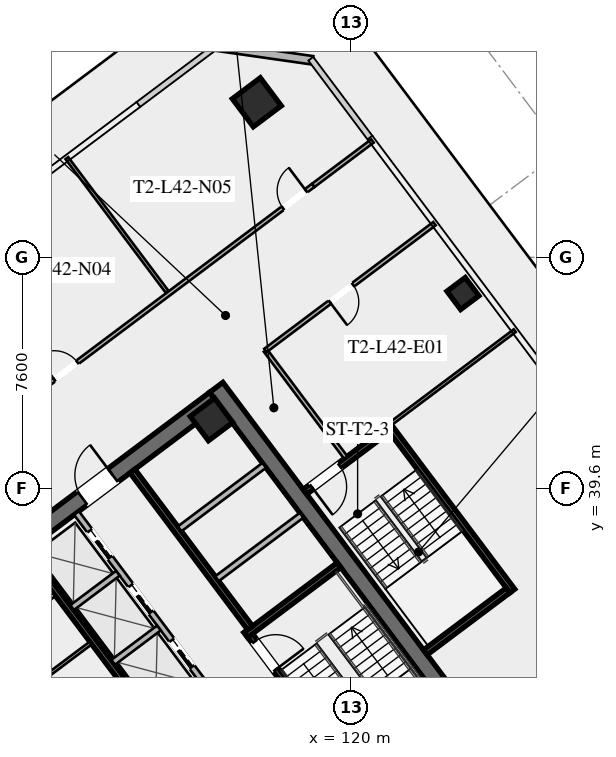
"""IFC4 building model, lengths in metres.
Left out: names, types, materials, properties, quantities, classifications, styles, units other than length and angle.
Written with IfcOpenShell. Run it as: python <this file> out.ifc"""

import sys

from ifc_helpers import new_model, si_unit, direction, frame, frame_2d, origin, origin_2d, place, context, subcontext, project, spatial, rectangle, hollow_rectangle, extrude, element, fill, save


model = new_model("IFC4")
c1 = context("Model", 3, precision=1e-05, world=origin(), true_north=direction((0.0, 1.0)))
c2 = subcontext(c1, "Body", "Model", "MODEL_VIEW")
j1 = project(units=[si_unit("LENGTHUNIT", "METRE"), si_unit("PLANEANGLEUNIT", "RADIAN")], contexts=[c1])
p1 = place(None, origin())
s1 = spatial("IfcSite", under=j1, at=p1, CompositionType="ELEMENT")
p2 = place(p1, origin())
s2 = spatial("IfcBuilding", under=s1, at=p2, CompositionType="ELEMENT")
p3 = place(p2, frame((0.0, 0.0, 157.0)))
s3 = spatial("IfcBuildingStorey", under=s2, at=p3, CompositionType="ELEMENT", Elevation=157.0)
for number, where, z_axis, x_axis in (
    (1, (112.436, 21.077, 0.0), (0.0, 0.0, 1.0), (-0.6, 0.8, 0.0)),
    (2, (115.564, 42.923, 0.0), (0.0, 0.0, 1.0), (0.6, -0.8, 0.0)),
):
    element("IfcWall", number, at=place(p3, frame(where, z_axis=z_axis, x_axis=x_axis)), inside=s3, PredefinedType="SHEAR", context=c2, shape_type="SweptSolid", body=[
        extrude(rectangle(XDim=15.6, YDim=0.55, at=frame_2d((7.8, 0.0))), origin(), (0.0, 0.0, 1.0), 3.55),
    ])
p4 = place(p3, frame((103.461, 33.502, 0.0), z_axis=(0.0, 0.0, 1.0), x_axis=(0.799998054672, 0.600002593761, 0.0)))
e3 = element("IfcWall", 3, at=p4, inside=s3, PredefinedType="SHEAR", context=c2, shape_type="SweptSolid", body=[
    extrude(rectangle(XDim=15.06, YDim=0.55, at=frame_2d((7.53, 0.0))), origin(), (0.0, 0.0, 1.0), 3.55),
])
p5 = place(p4, frame((4.58, 0.0, 0.0)))
e4 = element("IfcOpeningElement", 4, at=p5, cuts=e3, PredefinedType="OPENING", context=c2, shape_type="SweptSolid", body=[
    extrude(rectangle(XDim=1.25, YDim=2.25, at=frame_2d((0.625, 1.125))), frame((0.0, 0.285, 0.0), z_axis=(0.0, -1.0, 0.0), x_axis=(1.0, 0.0, 0.0)), (0.0, 0.0, 1.0), 0.57),
])
p6 = place(p4, frame((9.63, 0.0, 0.0)))
e5 = element("IfcOpeningElement", 5, at=p6, cuts=e3, PredefinedType="OPENING", context=c2, shape_type="SweptSolid", body=[
    extrude(rectangle(XDim=1.25, YDim=2.25, at=frame_2d((0.625, 1.125))), frame((0.0, 0.285, 0.0), z_axis=(0.0, -1.0, 0.0), x_axis=(1.0, 0.0, 0.0)), (0.0, 0.0, 1.0), 0.57),
])
p7 = place(p3, frame((115.41, 41.87, 0.0), z_axis=(0.0, 0.0, 1.0), x_axis=(0.799999996291, 0.600000004945, 0.0)))
e6 = element("IfcColumn", 6, at=p7, inside=s3, PredefinedType="COLUMN", context=c2, shape_type="SweptSolid", body=[
    extrude(hollow_rectangle(XDim=1.0, YDim=1.0, WallThickness=0.04, at=origin_2d()), origin(), (0.0, 0.0, 1.0), 3.37),
])
p8 = place(p3, frame((116.9, 52.3, -0.175), z_axis=(0.0, 0.0, 1.0), x_axis=(0.799999996291, 0.600000004945, 0.0)))
e7 = element("IfcColumn", 7, at=p8, inside=s3, PredefinedType="COLUMN", context=c2, shape_type="SweptSolid", body=[
    extrude(hollow_rectangle(XDim=1.15, YDim=1.15, WallThickness=0.045, at=origin_2d()), origin(), (0.0, 0.0, 1.0), 3.545),
])
p9 = place(p3, frame((123.68, 46.01, -0.175), z_axis=(0.0, 0.0, 1.0), x_axis=(0.799999996291, 0.600000004945, 0.0)))
e8 = element("IfcColumn", 8, at=p9, inside=s3, PredefinedType="COLUMN", context=c2, shape_type="SweptSolid", body=[
    extrude(hollow_rectangle(XDim=0.75, YDim=0.75, WallThickness=0.032, at=origin_2d()), origin(), (0.0, 0.0, 1.0), 3.545),
])
p10 = place(p3, frame((115.52, 54.14, 0.0), z_axis=(0.0, 0.0, 1.0), x_axis=(0.989950994782, -0.141410847992, 0.0)))
e9 = element("IfcWall", 9, at=p10, inside=s3, PredefinedType="SOLIDWALL", context=c2, shape_type="SweptSolid", body=[
    extrude(rectangle(XDim=3.253, YDim=0.28, at=frame_2d((1.626, 0.0))), origin(), (0.0, 0.0, 1.0), 3.37),
])
p11 = place(p3, frame((111.44, 29.08, 0.0), z_axis=(0.0, 0.0, 1.0), x_axis=(-0.59999029481, 0.8000072788, 0.0)))
e10 = element("IfcWall", 10, at=p11, inside=s3, PredefinedType="SHEAR", context=c2, shape_type="SweptSolid", body=[
    extrude(rectangle(XDim=8.05, YDim=0.2, at=frame_2d((4.025, 0.0))), origin(), (0.0, 0.0, 1.0), 3.37),
])
p12 = place(p11, frame((0.45, 0.0, 0.0)))
e11 = element("IfcOpeningElement", 11, at=p12, cuts=e10, PredefinedType="OPENING", context=c2, shape_type="SweptSolid", body=[
    extrude(rectangle(XDim=1.15, YDim=2.2, at=frame_2d((0.575, 1.1))), frame((0.0, 0.11, 0.0), z_axis=(0.0, -1.0, 0.0), x_axis=(1.0, 0.0, 0.0)), (0.0, 0.0, 1.0), 0.22),
])
p13 = place(p3, frame((116.56, 34.92, 0.0), z_axis=(0.0, 0.0, 1.0), x_axis=(0.59999029481, -0.8000072788, 0.0)))
e12 = element("IfcWall", 12, at=p13, inside=s3, PredefinedType="SHEAR", context=c2, shape_type="SweptSolid", body=[
    extrude(rectangle(XDim=8.05, YDim=0.2, at=frame_2d((4.025, 0.0))), origin(), (0.0, 0.0, 1.0), 3.37),
])
p14 = place(p13, frame((0.45, 0.0, 0.0)))
e13 = element("IfcOpeningElement", 13, at=p14, cuts=e12, PredefinedType="OPENING", context=c2, shape_type="SweptSolid", body=[
    extrude(rectangle(XDim=1.15, YDim=2.2, at=frame_2d((0.575, 1.1))), frame((0.0, 0.11, 0.0), z_axis=(0.0, -1.0, 0.0), x_axis=(1.0, 0.0, 0.0)), (0.0, 0.0, 1.0), 0.22),
])
p15 = place(p3, frame((116.54, 34.78, 0.0), z_axis=(0.0, 0.0, 1.0), x_axis=(0.800015298837, 0.599979601008, 0.0)))
e14 = element("IfcWall", 14, at=p15, inside=s3, PredefinedType="SHEAR", context=c2, shape_type="SweptSolid", body=[
    extrude(rectangle(XDim=3.83, YDim=0.2, at=frame_2d((1.915, 0.0))), origin(), (0.0, 0.0, 1.0), 3.37),
])
p16 = place(p3, frame((117.998, 25.936, 0.0), z_axis=(0.0, 0.0, 1.0), x_axis=(-0.600002693989, 0.799997979501, 0.0)))
e15 = element("IfcWall", 15, at=p16, inside=s3, PredefinedType="SHEAR", context=c2, shape_type="SweptSolid", body=[
    extrude(rectangle(XDim=14.5, YDim=0.2, at=frame_2d((7.25, 0.0))), origin(), (0.0, 0.0, 1.0), 3.37),
])
p17 = place(p3, frame((112.81, 40.17, 0.0), z_axis=(0.0, 0.0, 1.0), x_axis=(0.599993943644, -0.800004542231, 0.0)))
e16 = element("IfcWall", 16, at=p17, inside=s3, PredefinedType="SHEAR", context=c2, shape_type="SweptSolid", body=[
    extrude(rectangle(XDim=6.45, YDim=0.2, at=frame_2d((3.225, 0.0))), origin(), (0.0, 0.0, 1.0), 3.37),
])
for number, where, z_axis, x_axis in (
    (17, (115.59, 36.63, 0.0), (0.0, 0.0, 1.0), (0.8, 0.6, 0.0)),
    (18, (114.36, 38.27, 0.0), (0.0, 0.0, 1.0), (0.8, 0.6, 0.0)),
):
    element("IfcWall", number, at=place(p3, frame(where, z_axis=z_axis, x_axis=x_axis)), inside=s3, PredefinedType="SOLIDWALL", context=c2, shape_type="SweptSolid", body=[
        extrude(rectangle(XDim=3.48, YDim=0.2, at=frame_2d((1.74, 0.0))), origin(), (0.0, 0.0, 1.0), 3.37),
    ])
p18 = place(p3, frame((107.71, 34.22, 0.0), z_axis=(0.0, 0.0, 1.0), x_axis=(0.799981399002, 0.60002480053, 0.0)))
e19 = element("IfcWall", 19, at=p18, inside=s3, PredefinedType="PARTITIONING", context=c2, shape_type="SweptSolid", body=[
    extrude(rectangle(XDim=3.15, YDim=0.135, at=frame_2d((1.575, 0.0))), origin(), (0.0, 0.0, 1.0), 2.723),
])
p19 = place(p18, frame((1.05, 0.0, 0.0)))
e20 = element("IfcOpeningElement", 20, at=p19, cuts=e19, PredefinedType="OPENING", context=c2, shape_type="SweptSolid", body=[
    extrude(rectangle(XDim=1.05, YDim=2.2, at=frame_2d((0.525, 1.1))), frame((0.0, 0.077, 0.0), z_axis=(0.0, -1.0, 0.0), x_axis=(1.0, 0.0, 0.0)), (0.0, 0.0, 1.0), 0.155),
])
p20 = place(p3, frame((108.91, 32.62, 0.0), z_axis=(0.0, 0.0, 1.0), x_axis=(0.800018601094, 0.59997519774, 0.0)))
e21 = element("IfcWall", 21, at=p20, inside=s3, PredefinedType="PARTITIONING", context=c2, shape_type="SweptSolid", body=[
    extrude(rectangle(XDim=3.15, YDim=0.11, at=frame_2d((1.575, 0.0))), origin(), (0.0, 0.0, 1.0), 2.723),
])
p21 = place(p3, frame((115.11, 33.27, 0.0), z_axis=(0.0, 0.0, 1.0), x_axis=(-0.600011322243, 0.799991508192, 0.0)))
e22 = element("IfcWall", 22, at=p21, inside=s3, PredefinedType="SOLIDWALL", context=c2, shape_type="SweptSolid", body=[
    extrude(rectangle(XDim=6.9, YDim=0.2, at=frame_2d((3.45, 0.0))), origin(), (0.0, 0.0, 1.0), 3.37),
])
p22 = place(p21, frame((0.575, 0.0, 0.0)))
e23 = element("IfcOpeningElement", 23, at=p22, cuts=e22, PredefinedType="OPENING", context=c2, shape_type="SweptSolid", body=[
    extrude(rectangle(XDim=1.1, YDim=2.2, at=frame_2d((0.55, 1.1))), frame((0.0, 0.11, 0.0), z_axis=(0.0, -1.0, 0.0), x_axis=(1.0, 0.0, 0.0)), (0.0, 0.0, 1.0), 0.22),
])
p23 = place(p21, frame((2.825, 0.0, 0.0)))
e24 = element("IfcOpeningElement", 24, at=p23, cuts=e22, PredefinedType="OPENING", context=c2, shape_type="SweptSolid", body=[
    extrude(rectangle(XDim=1.1, YDim=2.2, at=frame_2d((0.55, 1.1))), frame((0.0, 0.11, 0.0), z_axis=(0.0, -1.0, 0.0), x_axis=(1.0, 0.0, 0.0)), (0.0, 0.0, 1.0), 0.22),
])
p24 = place(p21, frame((5.075, 0.0, 0.0)))
e25 = element("IfcOpeningElement", 25, at=p24, cuts=e22, PredefinedType="OPENING", context=c2, shape_type="SweptSolid", body=[
    extrude(rectangle(XDim=1.1, YDim=2.2, at=frame_2d((0.55, 1.1))), frame((0.0, 0.11, 0.0), z_axis=(0.0, -1.0, 0.0), x_axis=(1.0, 0.0, 0.0)), (0.0, 0.0, 1.0), 0.22),
])
p25 = place(p3, frame((112.176, 33.882, 0.0), z_axis=(0.0, 0.0, 1.0), x_axis=(0.8, 0.6, 0.0)))
e26 = element("IfcWall", 26, at=p25, inside=s3, PredefinedType="SOLIDWALL", context=c2, shape_type="SweptSolid", body=[
    extrude(rectangle(XDim=1.88, YDim=0.2, at=frame_2d((0.94, 0.0))), origin(), (0.0, 0.0, 1.0), 3.37),
])
p26 = place(p3, frame((110.826, 35.682, 0.0), z_axis=(0.0, 0.0, 1.0), x_axis=(0.799984418148, 0.600020775241, 0.0)))
e27 = element("IfcWall", 27, at=p26, inside=s3, PredefinedType="SOLIDWALL", context=c2, shape_type="SweptSolid", body=[
    extrude(rectangle(XDim=1.88, YDim=0.2, at=frame_2d((0.94, 0.0))), origin(), (0.0, 0.0, 1.0), 3.37),
])
p27 = place(p3, frame((125.304, 36.228, 0.0), z_axis=(0.0, 0.0, 1.0), x_axis=(-0.59998851072, 0.800008616831, 0.0)))
e28 = element("IfcWall", 28, at=p27, inside=s3, PredefinedType="SHEAR", context=c2, shape_type="SweptSolid", body=[
    extrude(rectangle(XDim=6.8, YDim=0.2, at=frame_2d((3.4, 0.0))), origin(), (0.0, 0.0, 1.0), 3.37),
])
p28 = place(p3, frame((121.204, 41.528, 0.0), z_axis=(0.0, 0.0, 1.0), x_axis=(-0.800017232136, -0.599977023131, 0.0)))
e29 = element("IfcWall", 29, at=p28, inside=s3, PredefinedType="SHEAR", context=c2, shape_type="SweptSolid", body=[
    extrude(rectangle(XDim=3.4, YDim=0.2, at=frame_2d((1.7, 0.0))), origin(), (0.0, 0.0, 1.0), 3.37),
])
p29 = place(p28, frame((1.975, 0.0, 0.0)))
e30 = element("IfcOpeningElement", 30, at=p29, cuts=e29, PredefinedType="OPENING", context=c2, shape_type="SweptSolid", body=[
    extrude(rectangle(XDim=1.15, YDim=2.2, at=frame_2d((0.575, 1.1))), frame((0.0, 0.11, 0.0), z_axis=(0.0, -1.0, 0.0), x_axis=(1.0, 0.0, 0.0)), (0.0, 0.0, 1.0), 0.22),
])
p30 = place(p3, frame((122.444, 34.208, 0.0), z_axis=(0.0, 0.0, 1.0), x_axis=(0.79999138319, 0.600011488909, 0.0)))
e31 = element("IfcWall", 31, at=p30, inside=s3, PredefinedType="SHEAR", context=c2, shape_type="SweptSolid", body=[
    extrude(rectangle(XDim=3.4, YDim=0.2, at=frame_2d((1.7, 0.0))), origin(), (0.0, 0.0, 1.0), 3.37),
])
p31 = place(p3, frame((119.824, 40.618, 0.0), z_axis=(0.0, 0.0, 1.0), x_axis=(-0.599982243973, 0.800013316712, 0.0)))
e32 = element("IfcWall", 32, at=p31, inside=s3, PredefinedType="PARTITIONING", context=c2, shape_type="SweptSolid", body=[
    extrude(rectangle(XDim=4.4, YDim=0.135, at=frame_2d((2.2, 0.0))), origin(), (0.0, 0.0, 1.0), 2.723),
])
p32 = place(p3, frame((95.8, 32.35, 0.0), z_axis=(0.0, 0.0, 1.0), x_axis=(0.8, 0.6, 0.0)))
e33 = element("IfcWall", 33, at=p32, inside=s3, PredefinedType="PARTITIONING", context=c2, shape_type="SweptSolid", body=[
    extrude(rectangle(XDim=28.7, YDim=0.135, at=frame_2d((14.35, 0.0))), origin(), (0.0, 0.0, 1.0), 2.723),
])
p33 = place(p32, frame((0.3, 0.0, 0.0)))
e34 = element("IfcOpeningElement", 34, at=p33, cuts=e33, PredefinedType="OPENING", context=c2, shape_type="SweptSolid", body=[
    extrude(rectangle(XDim=0.95, YDim=2.05, at=frame_2d((0.475, 1.025))), frame((0.0, 0.077, 0.0), z_axis=(0.0, -1.0, 0.0), x_axis=(1.0, 0.0, 0.0)), (0.0, 0.0, 1.0), 0.155),
])
p34 = place(p32, frame((9.959, 0.0, 0.0)))
e35 = element("IfcOpeningElement", 35, at=p34, cuts=e33, PredefinedType="OPENING", context=c2, shape_type="SweptSolid", body=[
    extrude(rectangle(XDim=0.95, YDim=2.05, at=frame_2d((0.475, 1.025))), frame((0.0, 0.077, 0.0), z_axis=(0.0, -1.0, 0.0), x_axis=(1.0, 0.0, 0.0)), (0.0, 0.0, 1.0), 0.155),
])
p35 = place(p32, frame((14.005, 0.0, 0.0)))
e36 = element("IfcOpeningElement", 36, at=p35, cuts=e33, PredefinedType="OPENING", context=c2, shape_type="SweptSolid", body=[
    extrude(rectangle(XDim=0.95, YDim=2.05, at=frame_2d((0.475, 1.025))), frame((0.0, 0.077, 0.0), z_axis=(0.0, -1.0, 0.0), x_axis=(1.0, 0.0, 0.0)), (0.0, 0.0, 1.0), 0.155),
])
p36 = place(p32, frame((18.049, 0.0, 0.0)))
e37 = element("IfcOpeningElement", 37, at=p36, cuts=e33, PredefinedType="OPENING", context=c2, shape_type="SweptSolid", body=[
    extrude(rectangle(XDim=0.95, YDim=2.05, at=frame_2d((0.475, 1.025))), frame((0.0, 0.077, 0.0), z_axis=(0.0, -1.0, 0.0), x_axis=(1.0, 0.0, 0.0)), (0.0, 0.0, 1.0), 0.155),
])
p37 = place(p32, frame((27.45, 0.0, 0.0)))
e38 = element("IfcOpeningElement", 38, at=p37, cuts=e33, PredefinedType="OPENING", context=c2, shape_type="SweptSolid", body=[
    extrude(rectangle(XDim=0.95, YDim=2.05, at=frame_2d((0.475, 1.025))), frame((0.0, 0.077, 0.0), z_axis=(0.0, -1.0, 0.0), x_axis=(1.0, 0.0, 0.0)), (0.0, 0.0, 1.0), 0.155),
])
p38 = place(p3, frame((118.76, 49.57, 0.0), z_axis=(0.0, 0.0, 1.0), x_axis=(0.800012055778, 0.599983925293, 0.0)))
e39 = element("IfcWall", 39, at=p38, inside=s3, PredefinedType="PARTITIONING", context=c2, shape_type="SweptSolid", body=[
    extrude(rectangle(XDim=2.43, YDim=0.135, at=frame_2d((1.215, 0.0))), origin(), (0.0, 0.0, 1.0), 2.723),
])
p39 = place(p3, frame((113.952, 46.064, 0.0), z_axis=(0.0, 0.0, 1.0), x_axis=(-0.599964488045, 0.800026632735, 0.0)))
e40 = element("IfcWall", 40, at=p39, inside=s3, PredefinedType="PARTITIONING", context=c2, shape_type="SweptSolid", body=[
    extrude(rectangle(XDim=5.5, YDim=0.11, at=frame_2d((2.75, 0.0))), origin(), (0.0, 0.0, 1.0), 2.723),
])
p40 = place(p3, frame((122.744, 48.308, 0.0), z_axis=(0.0, 0.0, 1.0), x_axis=(-0.79997892247, -0.600028102345, 0.0)))
e41 = element("IfcWall", 41, at=p40, inside=s3, PredefinedType="PARTITIONING", context=c2, shape_type="SweptSolid", body=[
    extrude(rectangle(XDim=6.95, YDim=0.135, at=frame_2d((3.475, 0.0))), origin(), (0.0, 0.0, 1.0), 2.723),
])
p41 = place(p40, frame((3.35, 0.0, 0.0)))
e42 = element("IfcOpeningElement", 42, at=p41, cuts=e41, PredefinedType="OPENING", context=c2, shape_type="SweptSolid", body=[
    extrude(rectangle(XDim=0.95, YDim=2.05, at=frame_2d((0.475, 1.025))), frame((0.0, 0.077, 0.0), z_axis=(0.0, -1.0, 0.0), x_axis=(1.0, 0.0, 0.0)), (0.0, 0.0, 1.0), 0.155),
])
p42 = place(p3, frame((125.208, 30.656, 0.0), z_axis=(0.0, 0.0, 1.0), x_axis=(0.800006797429, 0.599990936654, 0.0)))
e43 = element("IfcWall", 43, at=p42, inside=s3, PredefinedType="PARTITIONING", context=c2, shape_type="SweptSolid", body=[
    extrude(rectangle(XDim=8.62, YDim=0.135, at=frame_2d((4.31, 0.0))), origin(), (0.0, 0.0, 1.0), 2.723),
])
p43 = place(p42, frame((2.045, 0.0, 0.0)))
e44 = element("IfcOpeningElement", 44, at=p43, cuts=e43, PredefinedType="OPENING", context=c2, shape_type="SweptSolid", body=[
    extrude(rectangle(XDim=0.95, YDim=2.05, at=frame_2d((0.475, 1.025))), frame((0.0, 0.077, 0.0), z_axis=(0.0, -1.0, 0.0), x_axis=(1.0, 0.0, 0.0)), (0.0, 0.0, 1.0), 0.155),
])
p44 = place(p3, frame((125.384, 44.788, 0.0), z_axis=(0.0, 0.0, 1.0), x_axis=(-0.8, -0.6, 0.0)))
e45 = element("IfcWall", 45, at=p44, inside=s3, PredefinedType="PARTITIONING", context=c2, shape_type="SweptSolid", body=[
    extrude(rectangle(XDim=5.1, YDim=0.11, at=frame_2d((2.55, 0.0))), origin(), (0.0, 0.0, 1.0), 2.723),
])
p45 = place(p6, origin())
e46 = element("IfcDoor", 46, at=p45, inside=s3, OperationType="SINGLE_SWING_RIGHT", PredefinedType="DOOR", context=c2, shape_type="SweptSolid", body=[
    extrude(rectangle(XDim=1.25, YDim=2.25, at=frame_2d((0.625, 1.125))), frame((0.0, 0.025, 0.0), z_axis=(0.0, -1.0, 0.0), x_axis=(1.0, 0.0, 0.0)), (0.0, 0.0, 1.0), 0.05),
])
fill(e5, e46)
p46 = place(p14, origin())
e47 = element("IfcDoor", 47, at=p46, inside=s3, OperationType="SINGLE_SWING_RIGHT", PredefinedType="DOOR", context=c2, shape_type="SweptSolid", body=[
    extrude(rectangle(XDim=1.15, YDim=2.2, at=frame_2d((0.575, 1.1))), frame((0.0, 0.025, 0.0), z_axis=(0.0, -1.0, 0.0), x_axis=(1.0, 0.0, 0.0)), (0.0, 0.0, 1.0), 0.05),
])
fill(e13, e47)
p47 = place(p29, origin())
e48 = element("IfcDoor", 48, at=p47, inside=s3, OperationType="SINGLE_SWING_RIGHT", PredefinedType="DOOR", context=c2, shape_type="SweptSolid", body=[
    extrude(rectangle(XDim=1.15, YDim=2.2, at=frame_2d((0.575, 1.1))), frame((0.0, 0.025, 0.0), z_axis=(0.0, -1.0, 0.0), x_axis=(1.0, 0.0, 0.0)), (0.0, 0.0, 1.0), 0.05),
])
fill(e30, e48)
p48 = place(p36, origin())
e49 = element("IfcDoor", 49, at=p48, inside=s3, OperationType="SINGLE_SWING_LEFT", PredefinedType="DOOR", context=c2, shape_type="SweptSolid", body=[
    extrude(rectangle(XDim=0.95, YDim=2.05, at=frame_2d((0.475, 1.025))), frame((0.0, 0.025, 0.0), z_axis=(0.0, -1.0, 0.0), x_axis=(1.0, 0.0, 0.0)), (0.0, 0.0, 1.0), 0.05),
])
fill(e37, e49)
p49 = place(p37, origin())
e50 = element("IfcDoor", 50, at=p49, inside=s3, OperationType="SINGLE_SWING_RIGHT", PredefinedType="DOOR", context=c2, shape_type="SweptSolid", body=[
    extrude(rectangle(XDim=0.95, YDim=2.05, at=frame_2d((0.475, 1.025))), frame((0.0, 0.025, 0.0), z_axis=(0.0, -1.0, 0.0), x_axis=(1.0, 0.0, 0.0)), (0.0, 0.0, 1.0), 0.05),
])
fill(e38, e50)
p50 = place(p41, origin())
e51 = element("IfcDoor", 51, at=p50, inside=s3, OperationType="SINGLE_SWING_RIGHT", PredefinedType="DOOR", context=c2, shape_type="SweptSolid", body=[
    extrude(rectangle(XDim=0.95, YDim=2.05, at=frame_2d((0.475, 1.025))), frame((0.0, 0.025, 0.0), z_axis=(0.0, -1.0, 0.0), x_axis=(1.0, 0.0, 0.0)), (0.0, 0.0, 1.0), 0.05),
])
fill(e42, e51)
p51 = place(p22, origin())
e52 = element("IfcDoor", 52, at=p51, inside=s3, OperationType="SLIDING_TO_LEFT", PredefinedType="DOOR", context=c2, shape_type="SweptSolid", body=[
    extrude(rectangle(XDim=1.1, YDim=2.2, at=frame_2d((0.55, 1.1))), frame((0.0, 0.025, 0.0), z_axis=(0.0, -1.0, 0.0), x_axis=(1.0, 0.0, 0.0)), (0.0, 0.0, 1.0), 0.05),
])
fill(e23, e52)
p52 = place(p23, origin())
e53 = element("IfcDoor", 53, at=p52, inside=s3, OperationType="SLIDING_TO_LEFT", PredefinedType="DOOR", context=c2, shape_type="SweptSolid", body=[
    extrude(rectangle(XDim=1.1, YDim=2.2, at=frame_2d((0.55, 1.1))), frame((0.0, 0.025, 0.0), z_axis=(0.0, -1.0, 0.0), x_axis=(1.0, 0.0, 0.0)), (0.0, 0.0, 1.0), 0.05),
])
fill(e24, e53)
p53 = place(p24, origin())
e54 = element("IfcDoor", 54, at=p53, inside=s3, OperationType="SLIDING_TO_LEFT", PredefinedType="DOOR", context=c2, shape_type="SweptSolid", body=[
    extrude(rectangle(XDim=1.1, YDim=2.2, at=frame_2d((0.55, 1.1))), frame((0.0, 0.025, 0.0), z_axis=(0.0, -1.0, 0.0), x_axis=(1.0, 0.0, 0.0)), (0.0, 0.0, 1.0), 0.05),
])
fill(e25, e54)
save(model, sys.argv[1])
